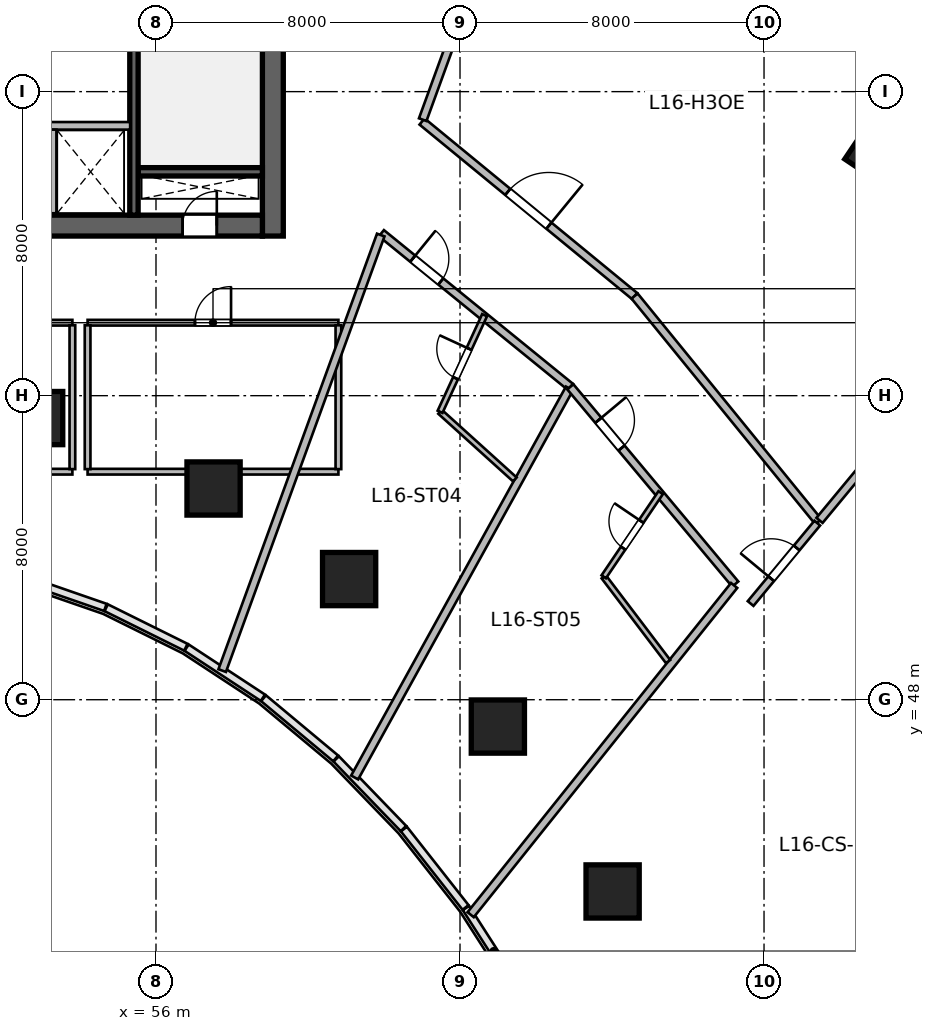
"""IFC4 building model, lengths in metres.
Left out: names, types, materials, properties, quantities, classifications, styles, units other than length and angle.
Written with IfcOpenShell. Run it as: python <this file> out.ifc"""

import sys

from ifc_helpers import new_model, si_unit, direction, frame, frame_2d, origin, origin_2d, place, context, subcontext, project, spatial, rectangle, circle, extrude, source, transform, mapped, element, fill, save


model = new_model("IFC4")
c1 = context("Model", 3, precision=1e-05, world=origin(), true_north=direction((0.0, 1.0)))
c2 = subcontext(c1, "Body", "Model", "MODEL_VIEW")
j1 = project(units=[si_unit("LENGTHUNIT", "METRE"), si_unit("PLANEANGLEUNIT", "RADIAN")], contexts=[c1])
p1 = place(None, origin())
s1 = spatial("IfcSite", under=j1, at=p1, CompositionType="ELEMENT")
p2 = place(p1, origin())
s2 = spatial("IfcBuilding", under=s1, at=p2, CompositionType="ELEMENT")
p3 = place(p2, frame((0.0, 0.0, 71.4)))
s3 = spatial("IfcBuildingStorey", under=s2, at=p3, CompositionType="ELEMENT", Elevation=71.4)
m1 = source(origin(), c2, "Body", "SweptSolid", [
    extrude(rectangle(XDim=12.0, YDim=0.55, at=frame_2d((6.0, 0.0))), origin(), (0.0, 0.0, 1.0), 3.6),
])
p4 = place(p3, frame((59.075, 60.2, 0.0), z_axis=(0.0, 0.0, 1.0), x_axis=(0.0, 1.0, 0.0)))
e1 = element("IfcWall", 1, at=p4, inside=s3, PredefinedType="SHEAR", context=c2, shape_type="MappedRepresentation", body=[
    mapped(m1, transform((0.0, 0.0, 0.0), scale=1.0)),
])
m2 = source(origin(), c2, "Body", "SweptSolid", [
    extrude(rectangle(XDim=21.6, YDim=0.55, at=frame_2d((10.8, 0.0))), origin(), (0.0, 0.0, 1.0), 3.6),
])
p5 = place(p3, frame((37.2, 60.475, 0.0), z_axis=(0.0, 0.0, 1.0), x_axis=(1.0, 0.0, 0.0)))
e2 = element("IfcWall", 2, at=p5, inside=s3, PredefinedType="SHEAR", context=c2, shape_type="MappedRepresentation", body=[
    mapped(m2, transform((0.0, 0.0, 0.0), scale=1.0)),
])
p6 = place(p5, frame((1.1, 0.0, 0.0)))
e3 = element("IfcOpeningElement", 3, at=p6, cuts=e2, PredefinedType="OPENING", context=c2, shape_type="SweptSolid", body=[
    extrude(rectangle(XDim=1.15, YDim=2.15, at=frame_2d((0.575, 1.075))), frame((0.0, 0.285, 0.0), z_axis=(0.0, -1.0, 0.0), x_axis=(1.0, 0.0, 0.0)), (0.0, 0.0, 1.0), 0.57),
])
p7 = place(p5, frame((19.5, 0.0, 0.0)))
e4 = element("IfcOpeningElement", 4, at=p7, cuts=e2, PredefinedType="OPENING", context=c2, shape_type="SweptSolid", body=[
    extrude(rectangle(XDim=0.9, YDim=2.1, at=frame_2d((0.45, 1.05))), frame((0.0, 0.285, 0.0), z_axis=(0.0, -1.0, 0.0), x_axis=(1.0, 0.0, 0.0)), (0.0, 0.0, 1.0), 0.57),
])
p8 = place(p5, frame((12.02, 0.0, 0.0)))
e5 = element("IfcOpeningElement", 5, at=p8, cuts=e2, PredefinedType="OPENING", context=c2, shape_type="SweptSolid", body=[
    extrude(rectangle(XDim=1.6, YDim=2.15, at=frame_2d((0.8, 1.075))), frame((0.0, 0.285, 0.0), z_axis=(0.0, -1.0, 0.0), x_axis=(1.0, 0.0, 0.0)), (0.0, 0.0, 1.0), 0.57),
])
m3 = source(origin(), c2, "Body", "SweptSolid", [
    extrude(rectangle(XDim=3.27, YDim=0.22, at=frame_2d((1.635, 0.0))), origin(), (0.0, 0.0, 1.0), 3.6),
])
p9 = place(p3, frame((55.53, 61.89, 0.0), z_axis=(0.0, 0.0, 1.0), x_axis=(1.0, 0.0, 0.0)))
e6 = element("IfcWall", 6, at=p9, inside=s3, PredefinedType="SHEAR", context=c2, shape_type="MappedRepresentation", body=[
    mapped(m3, transform((0.0, 0.0, 0.0), scale=1.0)),
])
m4 = source(origin(), c2, "Body", "SweptSolid", [
    extrude(rectangle(XDim=10.9, YDim=0.22, at=frame_2d((5.45, 0.0))), origin(), (0.0, 0.0, 1.0), 3.6),
])
p10 = place(p3, frame((55.42, 60.75, 0.0), z_axis=(0.0, 0.0, 1.0), x_axis=(0.0, 1.0, 0.0)))
e7 = element("IfcWall", 7, at=p10, inside=s3, PredefinedType="SHEAR", context=c2, shape_type="MappedRepresentation", body=[
    mapped(m4, transform((0.0, 0.0, 0.0), scale=1.0)),
])
p11 = place(p10, frame((9.495, 0.0, 0.0)))
e8 = element("IfcOpeningElement", 8, at=p11, cuts=e7, PredefinedType="OPENING", context=c2, shape_type="SweptSolid", body=[
    extrude(rectangle(XDim=1.15, YDim=2.15, at=frame_2d((0.575, 1.075))), frame((0.0, 0.12, 0.0), z_axis=(0.0, -1.0, 0.0), x_axis=(1.0, 0.0, 0.0)), (0.0, 0.0, 1.0), 0.24),
])
m5 = source(origin(), c2, "Body", "SweptSolid", [
    extrude(circle(Radius=0.7, at=origin_2d()), origin(), (0.0, 0.0, 1.0), 3.6),
])
for number, where, z_axis, x_axis in (
    (9, (52.846, 55.411, 0.0), (0.0, 0.0, 1.0), (0.143, 0.99, 0.0)),
    (10, (57.515, 53.558, 0.0), (0.0, 0.0, 1.0), (0.289, 0.957, 0.0)),
    (11, (61.082, 51.175, 0.0), (0.0, 0.0, 1.0), (0.409, 0.912, 0.0)),
    (12, (64.996, 47.294, 0.0), (0.0, 0.0, 1.0), (0.558, 0.83, 0.0)),
):
    element("IfcColumn", number, at=place(p3, frame(where, z_axis=z_axis, x_axis=x_axis)), inside=s3, PredefinedType="COLUMN", context=c2, shape_type="MappedRepresentation", body=[
        mapped(m5, transform((0.0, 0.0, 0.0), scale=1.0)),
    ])
m6 = source(origin(), c2, "Body", "SweptSolid", [
    extrude(rectangle(XDim=1.5, YDim=1.5, at=origin_2d()), origin(), (0.0, 0.0, 1.0), 3.6),
])
p12 = place(p3, frame((75.167, 62.43, 0.0), z_axis=(0.0, 0.0, 1.0), x_axis=(0.55774510898, 0.830012285095, 0.0)))
e13 = element("IfcColumn", 13, at=p12, inside=s3, PredefinedType="COLUMN", context=c2, shape_type="MappedRepresentation", body=[
    mapped(m6, transform((0.0, 0.0, 0.0), scale=1.0)),
])
p13 = place(p3, frame((68.015, 42.955, 0.0), z_axis=(0.0, 0.0, 1.0), x_axis=(0.690756218984, 0.723087716626, 0.0)))
e14 = element("IfcColumn", 14, at=p13, inside=s3, PredefinedType="COLUMN", context=c2, shape_type="MappedRepresentation", body=[
    mapped(m5, transform((0.0, 0.0, 0.0), scale=1.0)),
])
m7 = source(origin(), c2, "Body", "SweptSolid", [
    extrude(rectangle(XDim=4.1, YDim=0.2, at=frame_2d((2.05, 0.0))), origin(), (0.0, 0.0, 1.0), 3.36),
])
p14 = place(p3, frame((51.22, 63.1, 0.0), z_axis=(0.0, 0.0, 1.0), x_axis=(1.0, 0.0, 0.0)))
e15 = element("IfcWall", 15, at=p14, inside=s3, PredefinedType="SOLIDWALL", context=c2, shape_type="MappedRepresentation", body=[
    mapped(m7, transform((0.0, 0.0, 0.0), scale=1.0)),
])
m8 = source(origin(), c2, "Body", "SweptSolid", [
    extrude(rectangle(XDim=2.2, YDim=0.2, at=frame_2d((1.1, 0.0))), origin(), (0.0, 0.0, 1.0), 3.36),
])
p15 = place(p3, frame((53.28, 60.8, 0.0), z_axis=(0.0, 0.0, 1.0), x_axis=(0.0, 1.0, 0.0)))
e16 = element("IfcWall", 16, at=p15, inside=s3, PredefinedType="SOLIDWALL", context=c2, shape_type="MappedRepresentation", body=[
    mapped(m8, transform((0.0, 0.0, 0.0), scale=1.0)),
])
m9 = source(origin(), c2, "Body", "SweptSolid", [
    extrude(rectangle(XDim=11.6, YDim=0.15, at=frame_2d((5.8, 0.0))), origin(), (0.0, 0.0, 1.0), 3.36),
])
p16 = place(p3, frame((42.2, 54.0, 0.0), z_axis=(0.0, 0.0, 1.0), x_axis=(1.0, 0.0, 0.0)))
e17 = element("IfcWall", 17, at=p16, inside=s3, PredefinedType="PARTITIONING", context=c2, shape_type="MappedRepresentation", body=[
    mapped(m9, transform((0.0, 0.0, 0.0), scale=1.0)),
])
p17 = place(p3, frame((42.2, 57.92, 0.0), z_axis=(0.0, 0.0, 1.0), x_axis=(1.0, 0.0, 0.0)))
e18 = element("IfcWall", 18, at=p17, inside=s3, PredefinedType="PARTITIONING", context=c2, shape_type="MappedRepresentation", body=[
    mapped(m9, transform((0.0, 0.0, 0.0), scale=1.0)),
])
p18 = place(p17, frame((6.9, 0.0, 0.0)))
e19 = element("IfcOpeningElement", 19, at=p18, cuts=e18, PredefinedType="OPENING", context=c2, shape_type="SweptSolid", body=[
    extrude(rectangle(XDim=1.1, YDim=2.15, at=frame_2d((0.55, 1.075))), frame((0.0, 0.085, 0.0), z_axis=(0.0, -1.0, 0.0), x_axis=(1.0, 0.0, 0.0)), (0.0, 0.0, 1.0), 0.17),
])
m10 = source(origin(), c2, "Body", "SweptSolid", [
    extrude(rectangle(XDim=3.785, YDim=0.15, at=frame_2d((1.893, 0.0))), origin(), (0.0, 0.0, 1.0), 3.36),
])
p19 = place(p3, frame((53.8, 54.067, 0.0), z_axis=(0.0, 0.0, 1.0), x_axis=(0.0, 1.0, 0.0)))
e20 = element("IfcWall", 20, at=p19, inside=s3, PredefinedType="PARTITIONING", context=c2, shape_type="MappedRepresentation", body=[
    mapped(m10, transform((0.0, 0.0, 0.0), scale=1.0)),
])
m11 = source(origin(), c2, "Body", "SweptSolid", [
    extrude(rectangle(XDim=6.6, YDim=0.15, at=frame_2d((3.3, 0.0))), origin(), (0.0, 0.0, 1.0), 2.803),
])
p20 = place(p3, frame((54.2, 54.0, 0.0), z_axis=(0.0, 0.0, 1.0), x_axis=(1.0, 0.0, 0.0)))
e21 = element("IfcWall", 21, at=p20, inside=s3, PredefinedType="PARTITIONING", context=c2, shape_type="MappedRepresentation", body=[
    mapped(m11, transform((0.0, 0.0, 0.0), scale=1.0)),
])
m12 = source(origin(), c2, "Body", "SweptSolid", [
    extrude(rectangle(XDim=6.6, YDim=0.15, at=frame_2d((3.3, 0.0))), origin(), (0.0, 0.0, 1.0), 3.36),
])
p21 = place(p3, frame((54.2, 57.92, 0.0), z_axis=(0.0, 0.0, 1.0), x_axis=(1.0, 0.0, 0.0)))
e22 = element("IfcWall", 22, at=p21, inside=s3, PredefinedType="PARTITIONING", context=c2, shape_type="MappedRepresentation", body=[
    mapped(m12, transform((0.0, 0.0, 0.0), scale=1.0)),
])
p22 = place(p21, frame((2.825, 0.0, 0.0)))
e23 = element("IfcOpeningElement", 23, at=p22, cuts=e22, PredefinedType="OPENING", context=c2, shape_type="SweptSolid", body=[
    extrude(rectangle(XDim=0.95, YDim=2.1, at=frame_2d((0.475, 1.05))), frame((0.0, 0.085, 0.0), z_axis=(0.0, -1.0, 0.0), x_axis=(1.0, 0.0, 0.0)), (0.0, 0.0, 1.0), 0.17),
])
for number, where, z_axis, x_axis in (
    (24, (54.2, 54.067, 0.0), (0.0, 0.0, 1.0), (0.0, 1.0, 0.0)),
    (25, (60.8, 54.067, 0.0), (0.0, 0.0, 1.0), (0.0, 1.0, 0.0)),
):
    element("IfcWall", number, at=place(p3, frame(where, z_axis=z_axis, x_axis=x_axis)), inside=s3, PredefinedType="PARTITIONING", context=c2, shape_type="MappedRepresentation", body=[
        mapped(m10, transform((0.0, 0.0, 0.0), scale=1.0)),
    ])
m13 = source(origin(), c2, "Body", "SweptSolid", [
    extrude(rectangle(XDim=7.237, YDim=0.21, at=frame_2d((3.618, 0.0))), origin(), (0.0, 0.0, 1.0), 3.36),
])
p23 = place(p3, frame((63.001, 63.214, 0.0), z_axis=(0.0, 0.0, 1.0), x_axis=(0.772813707793, -0.634632943557, 0.0)))
e26 = element("IfcWall", 26, at=p23, inside=s3, PredefinedType="PARTITIONING", context=c2, shape_type="MappedRepresentation", body=[
    mapped(m13, transform((0.0, 0.0, 0.0), scale=1.0)),
])
p24 = place(p23, frame((2.918, 0.0, 0.0)))
e27 = element("IfcOpeningElement", 27, at=p24, cuts=e26, PredefinedType="OPENING", context=c2, shape_type="SweptSolid", body=[
    extrude(rectangle(XDim=1.4, YDim=2.15, at=frame_2d((0.7, 1.075))), frame((0.0, 0.115, 0.0), z_axis=(0.0, -1.0, 0.0), x_axis=(1.0, 0.0, 0.0)), (0.0, 0.0, 1.0), 0.23),
])
m14 = source(origin(), c2, "Body", "SweptSolid", [
    extrude(rectangle(XDim=7.659, YDim=0.21, at=frame_2d((3.829, 0.0))), origin(), (0.0, 0.0, 1.0), 3.36),
])
p25 = place(p3, frame((68.594, 58.621, 0.0), z_axis=(0.0, 0.0, 1.0), x_axis=(0.631489868862, -0.775384127723, 0.0)))
e28 = element("IfcWall", 28, at=p25, inside=s3, PredefinedType="PARTITIONING", context=c2, shape_type="MappedRepresentation", body=[
    mapped(m14, transform((0.0, 0.0, 0.0), scale=1.0)),
])
m15 = source(origin(), c2, "Body", "SweptSolid", [
    extrude(rectangle(XDim=12.088, YDim=0.21, at=frame_2d((6.044, 0.0))), origin(), (0.0, 0.0, 1.0), 3.36),
])
p26 = place(p3, frame((63.019, 63.262, 0.0), z_axis=(0.0, 0.0, 1.0), x_axis=(0.34203007529, 0.939689005787, 0.0)))
e29 = element("IfcWall", 29, at=p26, inside=s3, PredefinedType="PARTITIONING", context=c2, shape_type="MappedRepresentation", body=[
    mapped(m15, transform((0.0, 0.0, 0.0), scale=1.0)),
])
m16 = source(origin(), c2, "Body", "SweptSolid", [
    extrude(rectangle(XDim=10.975, YDim=0.21, at=frame_2d((5.487, 0.0))), origin(), (0.0, 0.0, 1.0), 3.36),
])
p27 = place(p3, frame((73.46, 52.719, 0.0), z_axis=(0.0, 0.0, 1.0), x_axis=(0.638125265812, 0.769932558821, 0.0)))
e30 = element("IfcWall", 30, at=p27, inside=s3, PredefinedType="PARTITIONING", context=c2, shape_type="MappedRepresentation", body=[
    mapped(m16, transform((0.0, 0.0, 0.0), scale=1.0)),
])
m17 = source(origin(), c2, "Body", "SweptSolid", [
    extrude(rectangle(XDim=6.408, YDim=0.21, at=frame_2d((3.204, 0.0))), origin(), (0.0, 0.0, 1.0), 3.36),
])
p28 = place(p3, frame((61.931, 60.275, 0.0), z_axis=(0.0, 0.0, 1.0), x_axis=(0.775878552904, -0.630882295792, 0.0)))
e31 = element("IfcWall", 31, at=p28, inside=s3, PredefinedType="PARTITIONING", context=c2, shape_type="MappedRepresentation", body=[
    mapped(m17, transform((0.0, 0.0, 0.0), scale=1.0)),
])
p29 = place(p28, frame((1.063, 0.0, 0.0)))
e32 = element("IfcOpeningElement", 32, at=p29, cuts=e31, PredefinedType="OPENING", context=c2, shape_type="SweptSolid", body=[
    extrude(rectangle(XDim=0.95, YDim=2.15, at=frame_2d((0.475, 1.075))), frame((0.0, 0.115, 0.0), z_axis=(0.0, -1.0, 0.0), x_axis=(1.0, 0.0, 0.0)), (0.0, 0.0, 1.0), 0.23),
])
m18 = source(origin(), c2, "Body", "SweptSolid", [
    extrude(rectangle(XDim=12.196, YDim=0.21, at=frame_2d((6.098, 0.0))), origin(), (0.0, 0.0, 1.0), 3.36),
])
p30 = place(p3, frame((57.742, 48.766, 0.0), z_axis=(0.0, 0.0, 1.0), x_axis=(0.342022711534, 0.939691686031, 0.0)))
e33 = element("IfcWall", 33, at=p30, inside=s3, PredefinedType="PARTITIONING", context=c2, shape_type="MappedRepresentation", body=[
    mapped(m18, transform((0.0, 0.0, 0.0), scale=1.0)),
])
m19 = source(origin(), c2, "Body", "SweptSolid", [
    extrude(rectangle(XDim=11.692, YDim=0.21, at=frame_2d((5.846, 0.0))), origin(), (0.0, 0.0, 1.0), 2.99),
])
p31 = place(p3, frame((61.228, 45.954, 0.0), z_axis=(0.0, 0.0, 1.0), x_axis=(0.483398579324, 0.875400373262, 0.0)))
e34 = element("IfcWall", 34, at=p31, inside=s3, PredefinedType="PARTITIONING", context=c2, shape_type="MappedRepresentation", body=[
    mapped(m19, transform((0.0, 0.0, 0.0), scale=1.0)),
])
m20 = source(origin(), c2, "Body", "SweptSolid", [
    extrude(rectangle(XDim=2.653, YDim=0.14, at=frame_2d((1.327, 0.0))), origin(), (0.0, 0.0, 1.0), 3.36),
])
p32 = place(p3, frame((63.475, 55.576, 0.0), z_axis=(0.0, 0.0, 1.0), x_axis=(0.741731938744, -0.67069645224, 0.0)))
e35 = element("IfcWall", 35, at=p32, inside=s3, PredefinedType="PARTITIONING", context=c2, shape_type="MappedRepresentation", body=[
    mapped(m20, transform((0.0, 0.0, 0.0), scale=1.0)),
])
m21 = source(origin(), c2, "Body", "SweptSolid", [
    extrude(rectangle(XDim=2.799, YDim=0.14, at=frame_2d((1.4, 0.0))), origin(), (0.0, 0.0, 1.0), 3.36),
])
p33 = place(p3, frame((63.475, 55.576, 0.0), z_axis=(0.0, 0.0, 1.0), x_axis=(0.418626740412, 0.908158384981, 0.0)))
e36 = element("IfcWall", 36, at=p33, inside=s3, PredefinedType="PARTITIONING", context=c2, shape_type="MappedRepresentation", body=[
    mapped(m21, transform((0.0, 0.0, 0.0), scale=1.0)),
])
p34 = place(p33, frame((0.975, 0.0, 0.0)))
e37 = element("IfcOpeningElement", 37, at=p34, cuts=e36, PredefinedType="OPENING", context=c2, shape_type="SweptSolid", body=[
    extrude(rectangle(XDim=0.85, YDim=2.05, at=frame_2d((0.425, 1.025))), frame((0.0, 0.08, 0.0), z_axis=(0.0, -1.0, 0.0), x_axis=(1.0, 0.0, 0.0)), (0.0, 0.0, 1.0), 0.16),
])
m22 = source(origin(), c2, "Body", "SweptSolid", [
    extrude(rectangle(XDim=6.764, YDim=0.21, at=frame_2d((3.382, 0.0))), origin(), (0.0, 0.0, 1.0), 3.36),
])
p35 = place(p3, frame((66.904, 56.232, 0.0), z_axis=(0.0, 0.0, 1.0), x_axis=(0.641433176235, -0.767178910311, 0.0)))
e38 = element("IfcWall", 38, at=p35, inside=s3, PredefinedType="PARTITIONING", context=c2, shape_type="MappedRepresentation", body=[
    mapped(m22, transform((0.0, 0.0, 0.0), scale=1.0)),
])
p36 = place(p35, frame((1.148, 0.0, 0.0)))
e39 = element("IfcOpeningElement", 39, at=p36, cuts=e38, PredefinedType="OPENING", context=c2, shape_type="SweptSolid", body=[
    extrude(rectangle(XDim=0.95, YDim=2.15, at=frame_2d((0.475, 1.075))), frame((0.0, 0.115, 0.0), z_axis=(0.0, -1.0, 0.0), x_axis=(1.0, 0.0, 0.0)), (0.0, 0.0, 1.0), 0.23),
])
m23 = source(origin(), c2, "Body", "SweptSolid", [
    extrude(rectangle(XDim=11.095, YDim=0.21, at=frame_2d((5.548, 0.0))), origin(), (0.0, 0.0, 1.0), 2.99),
])
p37 = place(p3, frame((64.281, 42.344, 0.0), z_axis=(0.0, 0.0, 1.0), x_axis=(0.6248131083, 0.780774346208, 0.0)))
e40 = element("IfcWall", 40, at=p37, inside=s3, PredefinedType="PARTITIONING", context=c2, shape_type="MappedRepresentation", body=[
    mapped(m23, transform((0.0, 0.0, 0.0), scale=1.0)),
])
m24 = source(origin(), c2, "Body", "SweptSolid", [
    extrude(rectangle(XDim=2.8, YDim=0.14, at=frame_2d((1.4, 0.0))), origin(), (0.0, 0.0, 1.0), 3.36),
])
p38 = place(p3, frame((67.782, 51.234, 0.0), z_axis=(0.0, 0.0, 1.0), x_axis=(0.604607833789, -0.796523299923, 0.0)))
e41 = element("IfcWall", 41, at=p38, inside=s3, PredefinedType="PARTITIONING", context=c2, shape_type="MappedRepresentation", body=[
    mapped(m24, transform((0.0, 0.0, 0.0), scale=1.0)),
])
m25 = source(origin(), c2, "Body", "SweptSolid", [
    extrude(rectangle(XDim=2.673, YDim=0.14, at=frame_2d((1.336, 0.0))), origin(), (0.0, 0.0, 1.0), 2.644),
])
p39 = place(p3, frame((67.782, 51.234, 0.0), z_axis=(0.0, 0.0, 1.0), x_axis=(0.560399679065, 0.828222312972, 0.0)))
e42 = element("IfcWall", 42, at=p39, inside=s3, PredefinedType="PARTITIONING", context=c2, shape_type="MappedRepresentation", body=[
    mapped(m25, transform((0.0, 0.0, 0.0), scale=1.0)),
])
p40 = place(p39, frame((0.911, 0.0, 0.0)))
e43 = element("IfcOpeningElement", 43, at=p40, cuts=e42, PredefinedType="OPENING", context=c2, shape_type="SweptSolid", body=[
    extrude(rectangle(XDim=0.85, YDim=2.05, at=frame_2d((0.425, 1.025))), frame((0.0, 0.08, 0.0), z_axis=(0.0, -1.0, 0.0), x_axis=(1.0, 0.0, 0.0)), (0.0, 0.0, 1.0), 0.16),
])
m26 = source(origin(), c2, "Body", "SweptSolid", [
    extrude(rectangle(XDim=2.748, YDim=0.195, at=frame_2d((1.374, 0.0))), origin(), (0.0, 0.0, 1.0), 3.36),
])
p41 = place(p3, frame((71.647, 50.531, 0.0), z_axis=(0.0, 0.0, 1.0), x_axis=(0.638111168284, 0.769944242729, 0.0)))
e44 = element("IfcWall", 44, at=p41, inside=s3, PredefinedType="PARTITIONING", context=c2, shape_type="MappedRepresentation", body=[
    mapped(m26, transform((0.0, 0.0, 0.0), scale=1.0)),
])
p42 = place(p41, frame((0.849, 0.0, 0.0)))
e45 = element("IfcOpeningElement", 45, at=p42, cuts=e44, PredefinedType="OPENING", context=c2, shape_type="SweptSolid", body=[
    extrude(rectangle(XDim=1.05, YDim=2.15, at=frame_2d((0.525, 1.075))), frame((0.0, 0.107, 0.0), z_axis=(0.0, -1.0, 0.0), x_axis=(1.0, 0.0, 0.0)), (0.0, 0.0, 1.0), 0.215),
])
m27 = source(origin(), c2, "Body", "SweptSolid", [
    extrude(rectangle(XDim=0.9, YDim=2.1, at=frame_2d((0.45, 1.05))), frame((0.0, 0.025, 0.0), z_axis=(0.0, -1.0, 0.0), x_axis=(1.0, 0.0, 0.0)), (0.0, 0.0, 1.0), 0.05),
])
p43 = place(p7, origin())
e46 = element("IfcDoor", 46, at=p43, inside=s3, OperationType="SINGLE_SWING_RIGHT", PredefinedType="DOOR", context=c2, shape_type="MappedRepresentation", body=[
    mapped(m27, transform((0.0, 0.0, 0.0), scale=1.0)),
])
fill(e4, e46)
m28 = source(origin(), c2, "Body", "SweptSolid", [
    extrude(rectangle(XDim=0.95, YDim=2.1, at=frame_2d((0.475, 1.05))), frame((0.0, 0.025, 0.0), z_axis=(0.0, -1.0, 0.0), x_axis=(1.0, 0.0, 0.0)), (0.0, 0.0, 1.0), 0.05),
])
p44 = place(p22, origin())
e47 = element("IfcDoor", 47, at=p44, inside=s3, OperationType="SINGLE_SWING_RIGHT", PredefinedType="DOOR", context=c2, shape_type="MappedRepresentation", body=[
    mapped(m28, transform((0.0, 0.0, 0.0), scale=1.0)),
])
fill(e23, e47)
m29 = source(origin(), c2, "Body", "SweptSolid", [
    extrude(rectangle(XDim=1.4, YDim=2.15, at=frame_2d((0.7, 1.075))), frame((0.0, 0.025, 0.0), z_axis=(0.0, -1.0, 0.0), x_axis=(1.0, 0.0, 0.0)), (0.0, 0.0, 1.0), 0.05),
])
p45 = place(p24, origin())
e48 = element("IfcDoor", 48, at=p45, inside=s3, OperationType="SINGLE_SWING_RIGHT", PredefinedType="DOOR", context=c2, shape_type="MappedRepresentation", body=[
    mapped(m29, transform((0.0, 0.0, 0.0), scale=1.0)),
])
fill(e27, e48)
m30 = source(origin(), c2, "Body", "SweptSolid", [
    extrude(rectangle(XDim=0.95, YDim=2.15, at=frame_2d((0.475, 1.075))), frame((0.0, 0.025, 0.0), z_axis=(0.0, -1.0, 0.0), x_axis=(1.0, 0.0, 0.0)), (0.0, 0.0, 1.0), 0.05),
])
p46 = place(p29, origin())
e49 = element("IfcDoor", 49, at=p46, inside=s3, OperationType="SINGLE_SWING_LEFT", PredefinedType="DOOR", context=c2, shape_type="MappedRepresentation", body=[
    mapped(m30, transform((0.0, 0.0, 0.0), scale=1.0)),
])
fill(e32, e49)
m31 = source(origin(), c2, "Body", "SweptSolid", [
    extrude(rectangle(XDim=0.85, YDim=2.05, at=frame_2d((0.425, 1.025))), frame((0.0, 0.025, 0.0), z_axis=(0.0, -1.0, 0.0), x_axis=(1.0, 0.0, 0.0)), (0.0, 0.0, 1.0), 0.05),
])
p47 = place(p34, origin())
e50 = element("IfcDoor", 50, at=p47, inside=s3, OperationType="SINGLE_SWING_RIGHT", PredefinedType="DOOR", context=c2, shape_type="MappedRepresentation", body=[
    mapped(m31, transform((0.0, 0.0, 0.0), scale=1.0)),
])
fill(e37, e50)
p48 = place(p36, origin())
e51 = element("IfcDoor", 51, at=p48, inside=s3, OperationType="SINGLE_SWING_LEFT", PredefinedType="DOOR", context=c2, shape_type="MappedRepresentation", body=[
    mapped(m30, transform((0.0, 0.0, 0.0), scale=1.0)),
])
fill(e39, e51)
p49 = place(p40, origin())
e52 = element("IfcDoor", 52, at=p49, inside=s3, OperationType="SINGLE_SWING_RIGHT", PredefinedType="DOOR", context=c2, shape_type="MappedRepresentation", body=[
    mapped(m31, transform((0.0, 0.0, 0.0), scale=1.0)),
])
fill(e43, e52)
m32 = source(origin(), c2, "Body", "SweptSolid", [
    extrude(rectangle(XDim=1.05, YDim=2.15, at=frame_2d((0.525, 1.075))), frame((0.0, 0.025, 0.0), z_axis=(0.0, -1.0, 0.0), x_axis=(1.0, 0.0, 0.0)), (0.0, 0.0, 1.0), 0.05),
])
p50 = place(p42, origin())
e53 = element("IfcDoor", 53, at=p50, inside=s3, OperationType="SINGLE_SWING_LEFT", PredefinedType="DOOR", context=c2, shape_type="MappedRepresentation", body=[
    mapped(m32, transform((0.0, 0.0, 0.0), scale=1.0)),
])
fill(e45, e53)
save(model, sys.argv[1])
